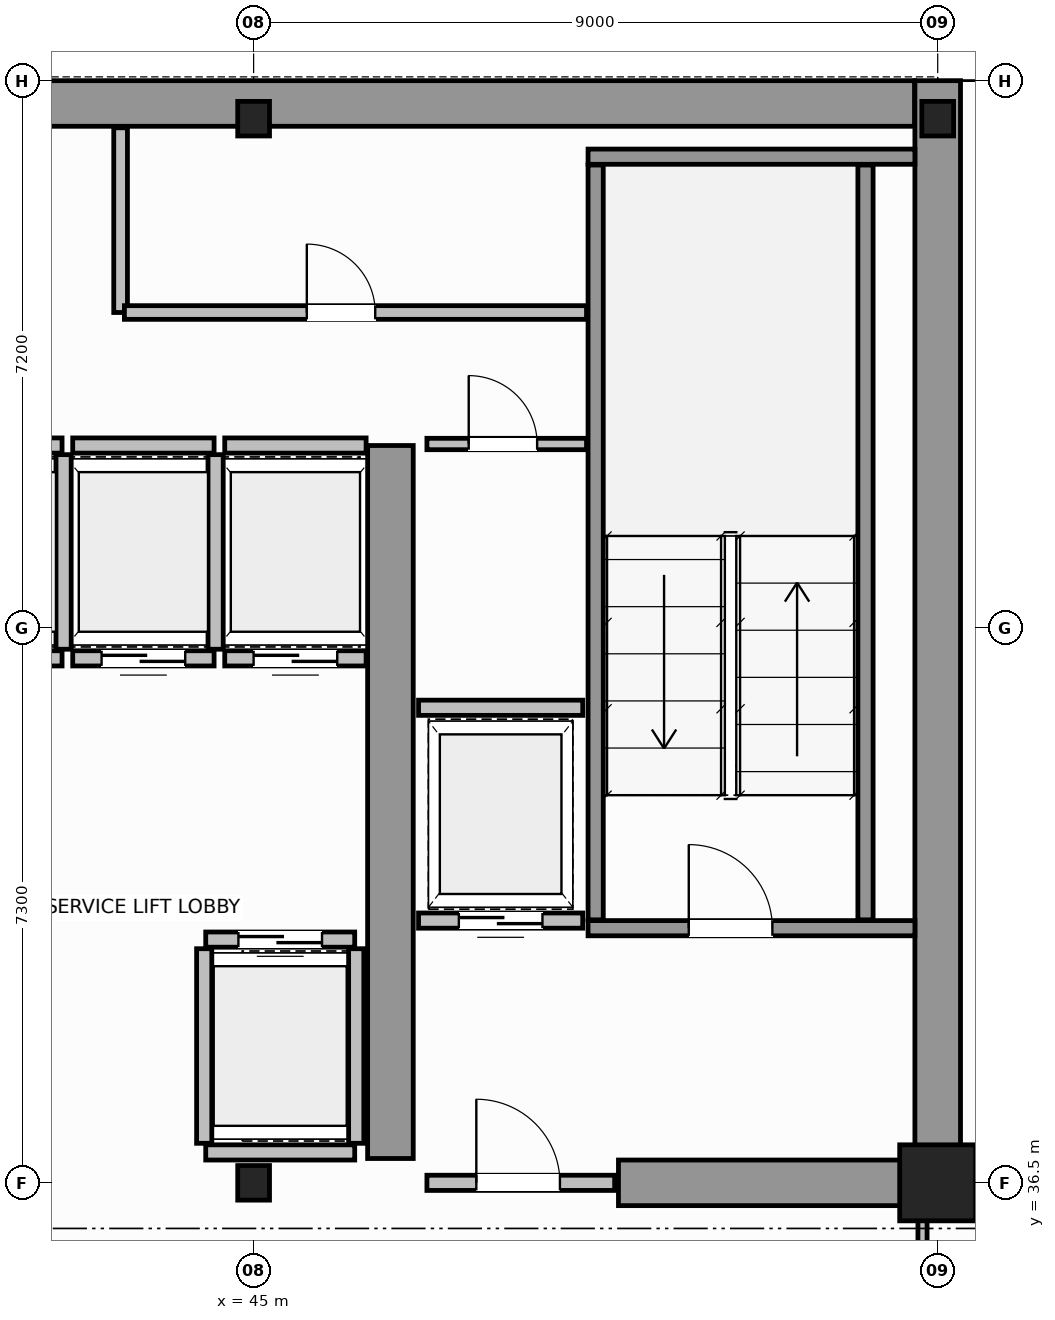
"""IFC4 building model, lengths in metres.
Left out: names, types, materials, properties, quantities, classifications, styles, units other than length and angle.
Written with IfcOpenShell. Run it as: python <this file> out.ifc"""

import sys

from ifc_helpers import new_model, si_unit, direction, frame, frame_2d, origin, origin_2d, place, context, subcontext, project, spatial, rectangle, i_section, extrude, source, transform, mapped, element, fill, save


model = new_model("IFC4")
c1 = context("Model", 3, precision=1e-05, world=origin(), true_north=direction((0.0, 1.0)))
c2 = subcontext(c1, "Body", "Model", "MODEL_VIEW")
j1 = project(units=[si_unit("LENGTHUNIT", "METRE"), si_unit("PLANEANGLEUNIT", "RADIAN")], contexts=[c1])
p1 = place(None, origin())
s1 = spatial("IfcSite", under=j1, at=p1, CompositionType="ELEMENT")
p2 = place(p1, origin())
s2 = spatial("IfcBuilding", under=s1, at=p2, CompositionType="ELEMENT")
p3 = place(p2, frame((0.0, 0.0, 214.6)))
s3 = spatial("IfcBuildingStorey", under=s2, at=p3, CompositionType="ELEMENT", Elevation=214.6)
m1 = source(origin(), c2, "Body", "SweptSolid", [
    extrude(i_section(OverallWidth=0.418, OverallDepth=0.455, WebThickness=0.042, FlangeThickness=0.058, FilletRadius=0.015, at=origin_2d()), origin(), (0.0, 0.0, 1.0), 3.8),
])
p4 = place(p3, frame((45.0, 36.5, 0.0), z_axis=(0.0, 0.0, 1.0), x_axis=(1.0, 0.0, 0.0)))
e1 = element("IfcColumn", 1, at=p4, inside=s3, PredefinedType="COLUMN", context=c2, shape_type="MappedRepresentation", body=[
    mapped(m1, transform((0.0, 0.0, 0.0), scale=1.0)),
])
m2 = source(origin(), c2, "Body", "SweptSolid", [
    extrude(rectangle(XDim=1.0, YDim=1.0, at=origin_2d()), origin(), (0.0, 0.0, 1.0), 3.8),
])
p5 = place(p3, frame((54.0, 36.5, 0.0), z_axis=(0.0, 0.0, 1.0), x_axis=(1.0, 0.0, 0.0)))
e2 = element("IfcColumn", 2, at=p5, inside=s3, PredefinedType="COLUMN", context=c2, shape_type="MappedRepresentation", body=[
    mapped(m2, transform((0.0, 0.0, 0.0), scale=1.0)),
])
for number, where, z_axis, x_axis in (
    (3, (45.0, 50.5, 0.0), (0.0, 0.0, 1.0), (1.0, 0.0, 0.0)),
    (4, (54.0, 50.5, 0.0), (0.0, 0.0, 1.0), (1.0, 0.0, 0.0)),
):
    element("IfcColumn", number, at=place(p3, frame(where, z_axis=z_axis, x_axis=x_axis)), inside=s3, PredefinedType="COLUMN", context=c2, shape_type="MappedRepresentation", body=[
        mapped(m1, transform((0.0, 0.0, 0.0), scale=1.0)),
    ])
p6 = place(p3, frame((34.002, 50.7, 0.0), z_axis=(0.0, 0.0, 1.0), x_axis=(1.0, 0.0, 0.0)))
e5 = element("IfcWall", 5, at=p6, inside=s3, PredefinedType="SHEAR", context=c2, shape_type="SweptSolid", body=[
    extrude(rectangle(XDim=19.694, YDim=0.6, at=frame_2d((9.847, 0.0))), origin(), (0.0, 0.0, 1.0), 3.8),
])
p7 = place(p3, frame((54.0, 36.5, 0.0), z_axis=(0.0, 0.0, 1.0), x_axis=(0.0, 1.0, 0.0)))
e6 = element("IfcWall", 6, at=p7, inside=s3, PredefinedType="SHEAR", context=c2, shape_type="SweptSolid", body=[
    extrude(rectangle(XDim=14.5, YDim=0.6, at=frame_2d((7.25, 0.0))), origin(), (0.0, 0.0, 1.0), 3.8),
])
p8 = place(p3, frame((49.8, 36.5, 0.0), z_axis=(0.0, 0.0, 1.0), x_axis=(1.0, 0.0, 0.0)))
e7 = element("IfcWall", 7, at=p8, inside=s3, PredefinedType="SHEAR", context=c2, shape_type="SweptSolid", body=[
    extrude(rectangle(XDim=3.88, YDim=0.6, at=frame_2d((1.94, 0.0))), origin(), (0.0, 0.0, 1.0), 2.54),
])
p9 = place(p3, frame((46.8, 36.82, 0.0), z_axis=(0.0, 0.0, 1.0), x_axis=(0.0, 1.0, 0.0)))
e8 = element("IfcWall", 8, at=p9, inside=s3, PredefinedType="SHEAR", context=c2, shape_type="SweptSolid", body=[
    extrude(rectangle(XDim=9.38, YDim=0.6, at=frame_2d((4.69, 0.0))), origin(), (0.0, 0.0, 1.0), 3.8),
])
p10 = place(p3, frame((49.4, 39.85, 0.0), z_axis=(0.0, 0.0, 1.0), x_axis=(1.0, 0.0, 0.0)))
e9 = element("IfcWall", 9, at=p10, inside=s3, PredefinedType="SOLIDWALL", context=c2, shape_type="SweptSolid", body=[
    extrude(rectangle(XDim=4.3, YDim=0.2, at=frame_2d((2.15, 0.0))), origin(), (0.0, 0.0, 1.0), 3.8),
])
p11 = place(p10, frame((1.325, 0.0, 0.0)))
e10 = element("IfcOpeningElement", 10, at=p11, cuts=e9, PredefinedType="OPENING", context=c2, shape_type="SweptSolid", body=[
    extrude(rectangle(XDim=1.1, YDim=2.15, at=frame_2d((0.55, 1.075))), frame((0.0, 0.11, 0.0), z_axis=(0.0, -1.0, 0.0), x_axis=(1.0, 0.0, 0.0)), (0.0, 0.0, 1.0), 0.22),
])
p12 = place(p3, frame((49.4, 50.0, 0.0), z_axis=(0.0, 0.0, 1.0), x_axis=(1.0, 0.0, 0.0)))
e11 = element("IfcWall", 11, at=p12, inside=s3, PredefinedType="SOLIDWALL", context=c2, shape_type="SweptSolid", body=[
    extrude(rectangle(XDim=4.3, YDim=0.2, at=frame_2d((2.15, 0.0))), origin(), (0.0, 0.0, 1.0), 3.8),
])
for number, where, z_axis, x_axis in (
    (12, (49.5, 39.96, 0.0), (0.0, 0.0, 1.0), (0.0, 1.0, 0.0)),
    (13, (53.05, 39.96, 0.0), (0.0, 0.0, 1.0), (0.0, 1.0, 0.0)),
):
    element("IfcWall", number, at=place(p3, frame(where, z_axis=z_axis, x_axis=x_axis)), inside=s3, PredefinedType="SOLIDWALL", context=c2, shape_type="SweptSolid", body=[
        extrude(rectangle(XDim=9.93, YDim=0.2, at=frame_2d((4.965, 0.0))), origin(), (0.0, 0.0, 1.0), 3.8),
    ])
p13 = place(p3, frame((47.28, 36.5, 0.0), z_axis=(0.0, 0.0, 1.0), x_axis=(1.0, 0.0, 0.0)))
e14 = element("IfcWall", 14, at=p13, inside=s3, PredefinedType="SOLIDWALL", context=c2, shape_type="SweptSolid", body=[
    extrude(rectangle(XDim=2.47, YDim=0.2, at=frame_2d((1.235, 0.0))), origin(), (0.0, 0.0, 1.0), 2.53),
])
p14 = place(p13, frame((0.65, 0.0, 0.0)))
e15 = element("IfcOpeningElement", 15, at=p14, cuts=e14, PredefinedType="OPENING", context=c2, shape_type="SweptSolid", body=[
    extrude(rectangle(XDim=1.1, YDim=2.15, at=frame_2d((0.55, 1.075))), frame((0.0, 0.11, 0.0), z_axis=(0.0, -1.0, 0.0), x_axis=(1.0, 0.0, 0.0)), (0.0, 0.0, 1.0), 0.22),
])
p15 = place(p3, frame((44.37, 39.7, 0.0), z_axis=(0.0, 0.0, 1.0), x_axis=(1.0, 0.0, 0.0)))
e16 = element("IfcWall", 16, at=p15, inside=s3, PredefinedType="SOLIDWALL", context=c2, shape_type="SweptSolid", body=[
    extrude(rectangle(XDim=1.96, YDim=0.2, at=frame_2d((0.98, 0.0))), origin(), (0.0, 0.0, 1.0), 3.54),
])
p16 = place(p15, frame((0.43, 0.0, 0.0)))
e17 = element("IfcOpeningElement", 17, at=p16, cuts=e16, PredefinedType="OPENING", context=c2, shape_type="SweptSolid", body=[
    extrude(rectangle(XDim=1.1, YDim=2.15, at=frame_2d((0.55, 1.075))), frame((0.0, 0.11, 0.0), z_axis=(0.0, -1.0, 0.0), x_axis=(1.0, 0.0, 0.0)), (0.0, 0.0, 1.0), 0.22),
])
p17 = place(p3, frame((44.37, 36.9, 0.0), z_axis=(0.0, 0.0, 1.0), x_axis=(1.0, 0.0, 0.0)))
e18 = element("IfcWall", 18, at=p17, inside=s3, PredefinedType="SOLIDWALL", context=c2, shape_type="SweptSolid", body=[
    extrude(rectangle(XDim=1.96, YDim=0.2, at=frame_2d((0.98, 0.0))), origin(), (0.0, 0.0, 1.0), 2.53),
])
for number, where, z_axis, x_axis in (
    (19, (44.35, 37.02, 0.0), (0.0, 0.0, 1.0), (0.0, 1.0, 0.0)),
    (20, (46.35, 37.02, 0.0), (0.0, 0.0, 1.0), (0.0, 1.0, 0.0)),
):
    element("IfcWall", number, at=place(p3, frame(where, z_axis=z_axis, x_axis=x_axis)), inside=s3, PredefinedType="SOLIDWALL", context=c2, shape_type="SweptSolid", body=[
        extrude(rectangle(XDim=2.56, YDim=0.2, at=frame_2d((1.28, 0.0))), origin(), (0.0, 0.0, 1.0), 3.54),
    ])
p18 = place(p3, frame((40.62, 43.4, 0.0), z_axis=(0.0, 0.0, 1.0), x_axis=(1.0, 0.0, 0.0)))
e21 = element("IfcWall", 21, at=p18, inside=s3, PredefinedType="SOLIDWALL", context=c2, shape_type="SweptSolid", body=[
    extrude(rectangle(XDim=1.86, YDim=0.2, at=frame_2d((0.93, 0.0))), origin(), (0.0, 0.0, 1.0), 3.54),
])
p19 = place(p18, frame((0.38, 0.0, 0.0)))
e22 = element("IfcOpeningElement", 22, at=p19, cuts=e21, PredefinedType="OPENING", context=c2, shape_type="SweptSolid", body=[
    extrude(rectangle(XDim=1.1, YDim=2.15, at=frame_2d((0.55, 1.075))), frame((0.0, 0.11, 0.0), z_axis=(0.0, -1.0, 0.0), x_axis=(1.0, 0.0, 0.0)), (0.0, 0.0, 1.0), 0.22),
])
p20 = place(p3, frame((40.62, 46.2, 0.0), z_axis=(0.0, 0.0, 1.0), x_axis=(1.0, 0.0, 0.0)))
e23 = element("IfcWall", 23, at=p20, inside=s3, PredefinedType="SOLIDWALL", context=c2, shape_type="SweptSolid", body=[
    extrude(rectangle(XDim=1.86, YDim=0.2, at=frame_2d((0.93, 0.0))), origin(), (0.0, 0.0, 1.0), 3.54),
])
p21 = place(p3, frame((42.5, 43.52, 0.0), z_axis=(0.0, 0.0, 1.0), x_axis=(0.0, 1.0, 0.0)))
e24 = element("IfcWall", 24, at=p21, inside=s3, PredefinedType="SOLIDWALL", context=c2, shape_type="SweptSolid", body=[
    extrude(rectangle(XDim=2.56, YDim=0.2, at=frame_2d((1.28, 0.0))), origin(), (0.0, 0.0, 1.0), 3.54),
])
p22 = place(p3, frame((42.62, 43.4, 0.0), z_axis=(0.0, 0.0, 1.0), x_axis=(1.0, 0.0, 0.0)))
e25 = element("IfcWall", 25, at=p22, inside=s3, PredefinedType="SOLIDWALL", context=c2, shape_type="SweptSolid", body=[
    extrude(rectangle(XDim=1.86, YDim=0.2, at=frame_2d((0.93, 0.0))), origin(), (0.0, 0.0, 1.0), 3.54),
])
p23 = place(p22, frame((0.38, 0.0, 0.0)))
e26 = element("IfcOpeningElement", 26, at=p23, cuts=e25, PredefinedType="OPENING", context=c2, shape_type="SweptSolid", body=[
    extrude(rectangle(XDim=1.1, YDim=2.15, at=frame_2d((0.55, 1.075))), frame((0.0, 0.11, 0.0), z_axis=(0.0, -1.0, 0.0), x_axis=(1.0, 0.0, 0.0)), (0.0, 0.0, 1.0), 0.22),
])
p24 = place(p3, frame((42.62, 46.2, 0.0), z_axis=(0.0, 0.0, 1.0), x_axis=(1.0, 0.0, 0.0)))
e27 = element("IfcWall", 27, at=p24, inside=s3, PredefinedType="SOLIDWALL", context=c2, shape_type="SweptSolid", body=[
    extrude(rectangle(XDim=1.86, YDim=0.2, at=frame_2d((0.93, 0.0))), origin(), (0.0, 0.0, 1.0), 3.54),
])
p25 = place(p3, frame((44.5, 43.52, 0.0), z_axis=(0.0, 0.0, 1.0), x_axis=(0.0, 1.0, 0.0)))
e28 = element("IfcWall", 28, at=p25, inside=s3, PredefinedType="SOLIDWALL", context=c2, shape_type="SweptSolid", body=[
    extrude(rectangle(XDim=2.56, YDim=0.2, at=frame_2d((1.28, 0.0))), origin(), (0.0, 0.0, 1.0), 3.54),
])
p26 = place(p3, frame((44.62, 43.4, 0.0), z_axis=(0.0, 0.0, 1.0), x_axis=(1.0, 0.0, 0.0)))
e29 = element("IfcWall", 29, at=p26, inside=s3, PredefinedType="SOLIDWALL", context=c2, shape_type="SweptSolid", body=[
    extrude(rectangle(XDim=1.86, YDim=0.2, at=frame_2d((0.93, 0.0))), origin(), (0.0, 0.0, 1.0), 3.54),
])
p27 = place(p26, frame((0.38, 0.0, 0.0)))
e30 = element("IfcOpeningElement", 30, at=p27, cuts=e29, PredefinedType="OPENING", context=c2, shape_type="SweptSolid", body=[
    extrude(rectangle(XDim=1.1, YDim=2.15, at=frame_2d((0.55, 1.075))), frame((0.0, 0.11, 0.0), z_axis=(0.0, -1.0, 0.0), x_axis=(1.0, 0.0, 0.0)), (0.0, 0.0, 1.0), 0.22),
])
p28 = place(p3, frame((44.62, 46.2, 0.0), z_axis=(0.0, 0.0, 1.0), x_axis=(1.0, 0.0, 0.0)))
e31 = element("IfcWall", 31, at=p28, inside=s3, PredefinedType="SOLIDWALL", context=c2, shape_type="SweptSolid", body=[
    extrude(rectangle(XDim=1.86, YDim=0.2, at=frame_2d((0.93, 0.0))), origin(), (0.0, 0.0, 1.0), 3.54),
])
p29 = place(p3, frame((47.17, 39.95, 0.0), z_axis=(0.0, 0.0, 1.0), x_axis=(1.0, 0.0, 0.0)))
e32 = element("IfcWall", 32, at=p29, inside=s3, PredefinedType="SOLIDWALL", context=c2, shape_type="SweptSolid", body=[
    extrude(rectangle(XDim=2.16, YDim=0.2, at=frame_2d((1.08, 0.0))), origin(), (0.0, 0.0, 1.0), 3.54),
])
p30 = place(p29, frame((0.53, 0.0, 0.0)))
e33 = element("IfcOpeningElement", 33, at=p30, cuts=e32, PredefinedType="OPENING", context=c2, shape_type="SweptSolid", body=[
    extrude(rectangle(XDim=1.1, YDim=2.15, at=frame_2d((0.55, 1.075))), frame((0.0, 0.11, 0.0), z_axis=(0.0, -1.0, 0.0), x_axis=(1.0, 0.0, 0.0)), (0.0, 0.0, 1.0), 0.22),
])
p31 = place(p3, frame((47.17, 42.75, 0.0), z_axis=(0.0, 0.0, 1.0), x_axis=(1.0, 0.0, 0.0)))
e34 = element("IfcWall", 34, at=p31, inside=s3, PredefinedType="SOLIDWALL", context=c2, shape_type="SweptSolid", body=[
    extrude(rectangle(XDim=2.16, YDim=0.2, at=frame_2d((1.08, 0.0))), origin(), (0.0, 0.0, 1.0), 3.54),
])
p32 = place(p3, frame((47.28, 46.22, 0.0), z_axis=(0.0, 0.0, 1.0), x_axis=(1.0, 0.0, 0.0)))
e35 = element("IfcWall", 35, at=p32, inside=s3, PredefinedType="PARTITIONING", context=c2, shape_type="SweptSolid", body=[
    extrude(rectangle(XDim=2.1, YDim=0.15, at=frame_2d((1.05, 0.0))), origin(), (0.0, 0.0, 1.0), 3.54),
])
p33 = place(p32, frame((0.55, 0.0, 0.0)))
e36 = element("IfcOpeningElement", 36, at=p33, cuts=e35, PredefinedType="OPENING", context=c2, shape_type="SweptSolid", body=[
    extrude(rectangle(XDim=0.9, YDim=2.1, at=frame_2d((0.45, 1.05))), frame((0.0, 0.085, 0.0), z_axis=(0.0, -1.0, 0.0), x_axis=(1.0, 0.0, 0.0)), (0.0, 0.0, 1.0), 0.17),
])
p34 = place(p3, frame((43.25, 47.95, 0.0), z_axis=(0.0, 0.0, 1.0), x_axis=(0.0, 1.0, 0.0)))
e37 = element("IfcWall", 37, at=p34, inside=s3, PredefinedType="PLUMBINGWALL", context=c2, shape_type="SweptSolid", body=[
    extrude(rectangle(XDim=2.43, YDim=0.18, at=frame_2d((1.215, 0.0))), origin(), (0.0, 0.0, 1.0), 3.54),
])
p35 = place(p3, frame((43.3, 47.95, 0.0), z_axis=(0.0, 0.0, 1.0), x_axis=(1.0, 0.0, 0.0)))
e38 = element("IfcWall", 38, at=p35, inside=s3, PredefinedType="PLUMBINGWALL", context=c2, shape_type="SweptSolid", body=[
    extrude(rectangle(XDim=6.08, YDim=0.18, at=frame_2d((3.04, 0.0))), origin(), (0.0, 0.0, 1.0), 3.54),
])
p36 = place(p35, frame((2.4, 0.0, 0.0)))
e39 = element("IfcOpeningElement", 39, at=p36, cuts=e38, PredefinedType="OPENING", context=c2, shape_type="SweptSolid", body=[
    extrude(rectangle(XDim=0.9, YDim=2.15, at=frame_2d((0.45, 1.075))), frame((0.0, 0.1, 0.0), z_axis=(0.0, -1.0, 0.0), x_axis=(1.0, 0.0, 0.0)), (0.0, 0.0, 1.0), 0.2),
])
p37 = place(p3, frame((53.8, 34.0, 0.0), z_axis=(0.0, 0.0, 1.0), x_axis=(0.0, 1.0, 0.0)))
e40 = element("IfcWall", 40, at=p37, inside=s3, PredefinedType="PARTITIONING", context=c2, shape_type="SweptSolid", body=[
    extrude(rectangle(XDim=2.44, YDim=0.12, at=frame_2d((1.22, 0.0))), origin(), (0.0, 0.0, 1.0), 3.54),
])
p38 = place(p37, frame((0.7, 0.0, 0.0)))
e41 = element("IfcOpeningElement", 41, at=p38, cuts=e40, PredefinedType="OPENING", context=c2, shape_type="SweptSolid", body=[
    extrude(rectangle(XDim=0.9, YDim=2.15, at=frame_2d((0.45, 1.075))), frame((0.0, 0.07, 0.0), z_axis=(0.0, -1.0, 0.0), x_axis=(1.0, 0.0, 0.0)), (0.0, 0.0, 1.0), 0.14),
])
m3 = source(origin(), c2, "Body", "SweptSolid", [
    extrude(rectangle(XDim=1.1, YDim=2.15, at=frame_2d((0.55, 1.075))), frame((0.0, 0.025, 0.0), z_axis=(0.0, -1.0, 0.0), x_axis=(1.0, 0.0, 0.0)), (0.0, 0.0, 1.0), 0.05),
])
p39 = place(p11, origin())
e42 = element("IfcDoor", 42, at=p39, inside=s3, OperationType="SINGLE_SWING_RIGHT", PredefinedType="DOOR", context=c2, shape_type="MappedRepresentation", body=[
    mapped(m3, transform((0.0, 0.0, 0.0), scale=1.0)),
])
fill(e10, e42)
p40 = place(p14, origin())
e43 = element("IfcDoor", 43, at=p40, inside=s3, OperationType="SINGLE_SWING_LEFT", PredefinedType="DOOR", context=c2, shape_type="MappedRepresentation", body=[
    mapped(m3, transform((0.0, 0.0, 0.0), scale=1.0)),
])
fill(e15, e43)
p41 = place(p16, origin())
e44 = element("IfcDoor", 44, at=p41, inside=s3, OperationType="DOUBLE_DOOR_SLIDING", PredefinedType="DOOR", context=c2, shape_type="MappedRepresentation", body=[
    mapped(m3, transform((0.0, 0.0, 0.0), scale=1.0)),
])
fill(e17, e44)
p42 = place(p23, origin())
e45 = element("IfcDoor", 45, at=p42, inside=s3, OperationType="DOUBLE_DOOR_SLIDING", PredefinedType="DOOR", context=c2, shape_type="MappedRepresentation", body=[
    mapped(m3, transform((0.0, 0.0, 0.0), scale=1.0)),
])
fill(e26, e45)
p43 = place(p27, origin())
e46 = element("IfcDoor", 46, at=p43, inside=s3, OperationType="DOUBLE_DOOR_SLIDING", PredefinedType="DOOR", context=c2, shape_type="MappedRepresentation", body=[
    mapped(m3, transform((0.0, 0.0, 0.0), scale=1.0)),
])
fill(e30, e46)
p44 = place(p30, origin())
e47 = element("IfcDoor", 47, at=p44, inside=s3, OperationType="DOUBLE_DOOR_SLIDING", PredefinedType="DOOR", context=c2, shape_type="MappedRepresentation", body=[
    mapped(m3, transform((0.0, 0.0, 0.0), scale=1.0)),
])
fill(e33, e47)
m4 = source(origin(), c2, "Body", "SweptSolid", [
    extrude(rectangle(XDim=0.9, YDim=2.1, at=frame_2d((0.45, 1.05))), frame((0.0, 0.025, 0.0), z_axis=(0.0, -1.0, 0.0), x_axis=(1.0, 0.0, 0.0)), (0.0, 0.0, 1.0), 0.05),
])
p45 = place(p33, origin())
e48 = element("IfcDoor", 48, at=p45, inside=s3, OperationType="SINGLE_SWING_RIGHT", PredefinedType="DOOR", context=c2, shape_type="MappedRepresentation", body=[
    mapped(m4, transform((0.0, 0.0, 0.0), scale=1.0)),
])
fill(e36, e48)
m5 = source(origin(), c2, "Body", "SweptSolid", [
    extrude(rectangle(XDim=0.9, YDim=2.15, at=frame_2d((0.45, 1.075))), frame((0.0, 0.025, 0.0), z_axis=(0.0, -1.0, 0.0), x_axis=(1.0, 0.0, 0.0)), (0.0, 0.0, 1.0), 0.05),
])
p46 = place(p36, origin())
e49 = element("IfcDoor", 49, at=p46, inside=s3, OperationType="SINGLE_SWING_RIGHT", PredefinedType="DOOR", context=c2, shape_type="MappedRepresentation", body=[
    mapped(m5, transform((0.0, 0.0, 0.0), scale=1.0)),
])
fill(e39, e49)
save(model, sys.argv[1])
